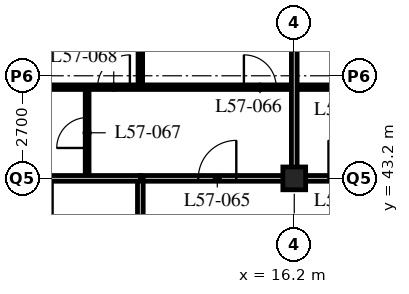
"""IFC4 building model, lengths in metres.
Left out: names, types, materials, properties, quantities, classifications, styles, units other than length and angle.
Written with IfcOpenShell. Run it as: python <this file> out.ifc"""

import sys

from ifc_helpers import new_model, si_unit, direction, frame, frame_2d, origin, origin_2d, place, context, subcontext, project, spatial, rectangle, hollow_rectangle, extrude, element, fill, save


model = new_model("IFC4")
c1 = context("Model", 3, precision=1e-05, world=origin(), true_north=direction((0.0, 1.0)))
c2 = subcontext(c1, "Body", "Model", "MODEL_VIEW")
j1 = project(units=[si_unit("LENGTHUNIT", "METRE"), si_unit("PLANEANGLEUNIT", "RADIAN")], contexts=[c1])
p1 = place(None, origin())
s1 = spatial("IfcSite", under=j1, at=p1, CompositionType="ELEMENT")
p2 = place(p1, origin())
s2 = spatial("IfcBuilding", under=s1, at=p2, CompositionType="ELEMENT")
p3 = place(p2, frame((0.0, 0.0, 220.8)))
s3 = spatial("IfcBuildingStorey", under=s2, at=p3, CompositionType="ELEMENT", Elevation=220.8)
p4 = place(p3, frame((16.2, 43.2, 0.0), z_axis=(0.0, 0.0, 1.0), x_axis=(1.0, 0.0, 0.0)))
e1 = element("IfcColumn", 1, at=p4, inside=s3, PredefinedType="COLUMN", context=c2, shape_type="SweptSolid", body=[
    extrude(hollow_rectangle(XDim=0.6, YDim=0.6, WallThickness=0.05, at=origin_2d()), origin(), (0.0, 0.0, 1.0), 3.6),
])
p5 = place(p3, frame((12.15, 43.2, 0.0), z_axis=(0.0, 0.0, 1.0), x_axis=(1.0, 0.0, 0.0)))
e2 = element("IfcWall", 2, at=p5, inside=s3, PredefinedType="PARTITIONING", context=c2, shape_type="SweptSolid", body=[
    extrude(rectangle(XDim=36.45, YDim=0.15, at=frame_2d((18.225, 0.0))), origin(), (0.0, 0.0, 1.0), 2.628),
])
p6 = place(p5, frame((4.95, 0.0, 0.0)))
e3 = element("IfcOpeningElement", 3, at=p6, cuts=e2, PredefinedType="OPENING", context=c2, shape_type="SweptSolid", body=[
    extrude(rectangle(XDim=1.0, YDim=2.1, at=frame_2d((0.5, 1.05))), frame((0.0, 0.085, 0.0), z_axis=(0.0, -1.0, 0.0), x_axis=(1.0, 0.0, 0.0)), (0.0, 0.0, 1.0), 0.17),
])
p7 = place(p5, frame((25.0, 0.0, 0.0)))
e4 = element("IfcOpeningElement", 4, at=p7, cuts=e2, PredefinedType="OPENING", context=c2, shape_type="SweptSolid", body=[
    extrude(rectangle(XDim=1.0, YDim=2.1, at=frame_2d((0.5, 1.05))), frame((0.0, 0.085, 0.0), z_axis=(0.0, -1.0, 0.0), x_axis=(1.0, 0.0, 0.0)), (0.0, 0.0, 1.0), 0.17),
])
p8 = place(p5, frame((30.7, 0.0, 0.0)))
e5 = element("IfcOpeningElement", 5, at=p8, cuts=e2, PredefinedType="OPENING", context=c2, shape_type="SweptSolid", body=[
    extrude(rectangle(XDim=1.0, YDim=2.1, at=frame_2d((0.5, 1.05))), frame((0.0, 0.085, 0.0), z_axis=(0.0, -1.0, 0.0), x_axis=(1.0, 0.0, 0.0)), (0.0, 0.0, 1.0), 0.17),
])
p9 = place(p5, frame((33.925, 0.0, 0.0)))
e6 = element("IfcOpeningElement", 6, at=p9, cuts=e2, PredefinedType="OPENING", context=c2, shape_type="SweptSolid", body=[
    extrude(rectangle(XDim=1.0, YDim=2.1, at=frame_2d((0.5, 1.05))), frame((0.0, 0.085, 0.0), z_axis=(0.0, -1.0, 0.0), x_axis=(1.0, 0.0, 0.0)), (0.0, 0.0, 1.0), 0.17),
])
p10 = place(p5, frame((1.525, 0.0, 0.0)))
e7 = element("IfcOpeningElement", 7, at=p10, cuts=e2, PredefinedType="OPENING", context=c2, shape_type="SweptSolid", body=[
    extrude(rectangle(XDim=1.0, YDim=2.1, at=frame_2d((0.5, 1.05))), frame((0.0, 0.085, 0.0), z_axis=(0.0, -1.0, 0.0), x_axis=(1.0, 0.0, 0.0)), (0.0, 0.0, 1.0), 0.17),
])
p11 = place(p3, frame((12.15, 18.9, 0.0), z_axis=(0.0, 0.0, 1.0), x_axis=(0.0, 1.0, 0.0)))
e8 = element("IfcWall", 8, at=p11, inside=s3, PredefinedType="PARTITIONING", context=c2, shape_type="SweptSolid", body=[
    extrude(rectangle(XDim=24.3, YDim=0.15, at=frame_2d((12.15, 0.0))), origin(), (0.0, 0.0, 1.0), 3.39),
])
p12 = place(p11, frame((0.4, 0.0, 0.0)))
e9 = element("IfcOpeningElement", 9, at=p12, cuts=e8, PredefinedType="OPENING", context=c2, shape_type="SweptSolid", body=[
    extrude(rectangle(XDim=1.0, YDim=2.1, at=frame_2d((0.5, 1.05))), frame((0.0, 0.085, 0.0), z_axis=(0.0, -1.0, 0.0), x_axis=(1.0, 0.0, 0.0)), (0.0, 0.0, 1.0), 0.17),
])
p13 = place(p11, frame((16.6, 0.0, 0.0)))
e10 = element("IfcOpeningElement", 10, at=p13, cuts=e8, PredefinedType="OPENING", context=c2, shape_type="SweptSolid", body=[
    extrude(rectangle(XDim=1.0, YDim=2.1, at=frame_2d((0.5, 1.05))), frame((0.0, 0.085, 0.0), z_axis=(0.0, -1.0, 0.0), x_axis=(1.0, 0.0, 0.0)), (0.0, 0.0, 1.0), 0.17),
])
p14 = place(p3, frame((10.75, 43.2, 0.0), z_axis=(0.0, 0.0, 1.0), x_axis=(0.0, 1.0, 0.0)))
e11 = element("IfcWall", 11, at=p14, inside=s3, PredefinedType="PARTITIONING", context=c2, shape_type="SweptSolid", body=[
    extrude(rectangle(XDim=2.4, YDim=0.1, at=frame_2d((1.2, 0.0))), origin(), (0.0, 0.0, 1.0), 3.39),
])
p15 = place(p14, frame((0.8, 0.0, 0.0)))
e12 = element("IfcOpeningElement", 12, at=p15, cuts=e11, PredefinedType="OPENING", context=c2, shape_type="SweptSolid", body=[
    extrude(rectangle(XDim=0.8, YDim=2.1, at=frame_2d((0.4, 1.05))), frame((0.0, 0.06, 0.0), z_axis=(0.0, -1.0, 0.0), x_axis=(1.0, 0.0, 0.0)), (0.0, 0.0, 1.0), 0.12),
])
p16 = place(p3, frame((8.15, 45.6, 0.0), z_axis=(0.0, 0.0, 1.0), x_axis=(1.0, 0.0, 0.0)))
e13 = element("IfcWall", 13, at=p16, inside=s3, PredefinedType="PARTITIONING", context=c2, shape_type="SweptSolid", body=[
    extrude(rectangle(XDim=28.3, YDim=0.12, at=frame_2d((14.15, 0.0))), origin(), (0.0, 0.0, 1.0), 3.39),
])
p17 = place(p16, frame((9.025, 0.0, 0.0)))
e14 = element("IfcOpeningElement", 14, at=p17, cuts=e13, PredefinedType="OPENING", context=c2, shape_type="SweptSolid", body=[
    extrude(rectangle(XDim=0.85, YDim=2.1, at=frame_2d((0.425, 1.05))), frame((0.0, 0.07, 0.0), z_axis=(0.0, -1.0, 0.0), x_axis=(1.0, 0.0, 0.0)), (0.0, 0.0, 1.0), 0.14),
])
p18 = place(p16, frame((16.475, 0.0, 0.0)))
e15 = element("IfcOpeningElement", 15, at=p18, cuts=e13, PredefinedType="OPENING", context=c2, shape_type="SweptSolid", body=[
    extrude(rectangle(XDim=0.85, YDim=2.1, at=frame_2d((0.425, 1.05))), frame((0.0, 0.07, 0.0), z_axis=(0.0, -1.0, 0.0), x_axis=(1.0, 0.0, 0.0)), (0.0, 0.0, 1.0), 0.14),
])
p19 = place(p16, frame((20.525, 0.0, 0.0)))
e16 = element("IfcOpeningElement", 16, at=p19, cuts=e13, PredefinedType="OPENING", context=c2, shape_type="SweptSolid", body=[
    extrude(rectangle(XDim=0.85, YDim=2.1, at=frame_2d((0.425, 1.05))), frame((0.0, 0.07, 0.0), z_axis=(0.0, -1.0, 0.0), x_axis=(1.0, 0.0, 0.0)), (0.0, 0.0, 1.0), 0.14),
])
p20 = place(p16, frame((24.575, 0.0, 0.0)))
e17 = element("IfcOpeningElement", 17, at=p20, cuts=e13, PredefinedType="OPENING", context=c2, shape_type="SweptSolid", body=[
    extrude(rectangle(XDim=0.85, YDim=2.1, at=frame_2d((0.425, 1.05))), frame((0.0, 0.07, 0.0), z_axis=(0.0, -1.0, 0.0), x_axis=(1.0, 0.0, 0.0)), (0.0, 0.0, 1.0), 0.14),
])
p21 = place(p16, frame((6.725, 0.0, 0.0)))
e18 = element("IfcOpeningElement", 18, at=p21, cuts=e13, PredefinedType="OPENING", context=c2, shape_type="SweptSolid", body=[
    extrude(rectangle(XDim=0.85, YDim=2.1, at=frame_2d((0.425, 1.05))), frame((0.0, 0.07, 0.0), z_axis=(0.0, -1.0, 0.0), x_axis=(1.0, 0.0, 0.0)), (0.0, 0.0, 1.0), 0.14),
])
p22 = place(p16, frame((2.875, 0.0, 0.0)))
e19 = element("IfcOpeningElement", 19, at=p22, cuts=e13, PredefinedType="OPENING", context=c2, shape_type="SweptSolid", body=[
    extrude(rectangle(XDim=0.85, YDim=2.1, at=frame_2d((0.425, 1.05))), frame((0.0, 0.07, 0.0), z_axis=(0.0, -1.0, 0.0), x_axis=(1.0, 0.0, 0.0)), (0.0, 0.0, 1.0), 0.14),
])
p23 = place(p3, frame((12.15, 45.6, 0.0), z_axis=(0.0, 0.0, 1.0), x_axis=(0.0, 1.0, 0.0)))
e20 = element("IfcWall", 20, at=p23, inside=s3, PredefinedType="PARTITIONING", context=c2, shape_type="SweptSolid", body=[
    extrude(rectangle(XDim=13.5, YDim=0.12, at=frame_2d((6.75, 0.0))), origin(), (0.0, 0.0, 1.0), 3.39),
])
p24 = place(p3, frame((0.3, 43.2, 0.0), z_axis=(0.0, 0.0, 1.0), x_axis=(1.0, 0.0, 0.0)))
e21 = element("IfcWall", 21, at=p24, inside=s3, PredefinedType="PARTITIONING", context=c2, shape_type="SweptSolid", body=[
    extrude(rectangle(XDim=11.85, YDim=0.15, at=frame_2d((5.925, 0.0))), origin(), (0.0, 0.0, 1.0), 2.628),
])
p25 = place(p3, frame((16.2, 43.2, 0.0), z_axis=(0.0, 0.0, 1.0), x_axis=(0.0, 1.0, 0.0)))
e22 = element("IfcWall", 22, at=p25, inside=s3, PredefinedType="PARTITIONING", context=c2, shape_type="SweptSolid", body=[
    extrude(rectangle(XDim=15.9, YDim=0.15, at=frame_2d((7.95, 0.0))), origin(), (0.0, 0.0, 1.0), 2.628),
])
p26 = place(p6, origin())
e23 = element("IfcDoor", 23, at=p26, inside=s3, OperationType="SINGLE_SWING_LEFT", PredefinedType="DOOR", context=c2, shape_type="SweptSolid", body=[
    extrude(rectangle(XDim=1.0, YDim=2.1, at=frame_2d((0.5, 1.05))), frame((0.0, 0.025, 0.0), z_axis=(0.0, -1.0, 0.0), x_axis=(1.0, 0.0, 0.0)), (0.0, 0.0, 1.0), 0.05),
])
fill(e3, e23)
p27 = place(p10, origin())
e24 = element("IfcDoor", 24, at=p27, inside=s3, OperationType="SINGLE_SWING_RIGHT", PredefinedType="DOOR", context=c2, shape_type="SweptSolid", body=[
    extrude(rectangle(XDim=1.0, YDim=2.1, at=frame_2d((0.5, 1.05))), frame((0.0, 0.025, 0.0), z_axis=(0.0, -1.0, 0.0), x_axis=(1.0, 0.0, 0.0)), (0.0, 0.0, 1.0), 0.05),
])
fill(e7, e24)
p28 = place(p21, origin())
e25 = element("IfcDoor", 25, at=p28, inside=s3, OperationType="SINGLE_SWING_LEFT", PredefinedType="DOOR", context=c2, shape_type="SweptSolid", body=[
    extrude(rectangle(XDim=0.85, YDim=2.1, at=frame_2d((0.425, 1.05))), frame((0.0, 0.025, 0.0), z_axis=(0.0, -1.0, 0.0), x_axis=(1.0, 0.0, 0.0)), (0.0, 0.0, 1.0), 0.05),
])
fill(e18, e25)
p29 = place(p15, origin())
e26 = element("IfcDoor", 26, at=p29, inside=s3, OperationType="SINGLE_SWING_LEFT", PredefinedType="DOOR", context=c2, shape_type="SweptSolid", body=[
    extrude(rectangle(XDim=0.8, YDim=2.1, at=frame_2d((0.4, 1.05))), frame((0.0, 0.025, 0.0), z_axis=(0.0, -1.0, 0.0), x_axis=(1.0, 0.0, 0.0)), (0.0, 0.0, 1.0), 0.05),
])
fill(e12, e26)
p30 = place(p22, origin())
e27 = element("IfcDoor", 27, at=p30, inside=s3, OperationType="SINGLE_SWING_RIGHT", PredefinedType="DOOR", context=c2, shape_type="SweptSolid", body=[
    extrude(rectangle(XDim=0.85, YDim=2.1, at=frame_2d((0.425, 1.05))), frame((0.0, 0.025, 0.0), z_axis=(0.0, -1.0, 0.0), x_axis=(1.0, 0.0, 0.0)), (0.0, 0.0, 1.0), 0.05),
])
fill(e19, e27)
save(model, sys.argv[1])
